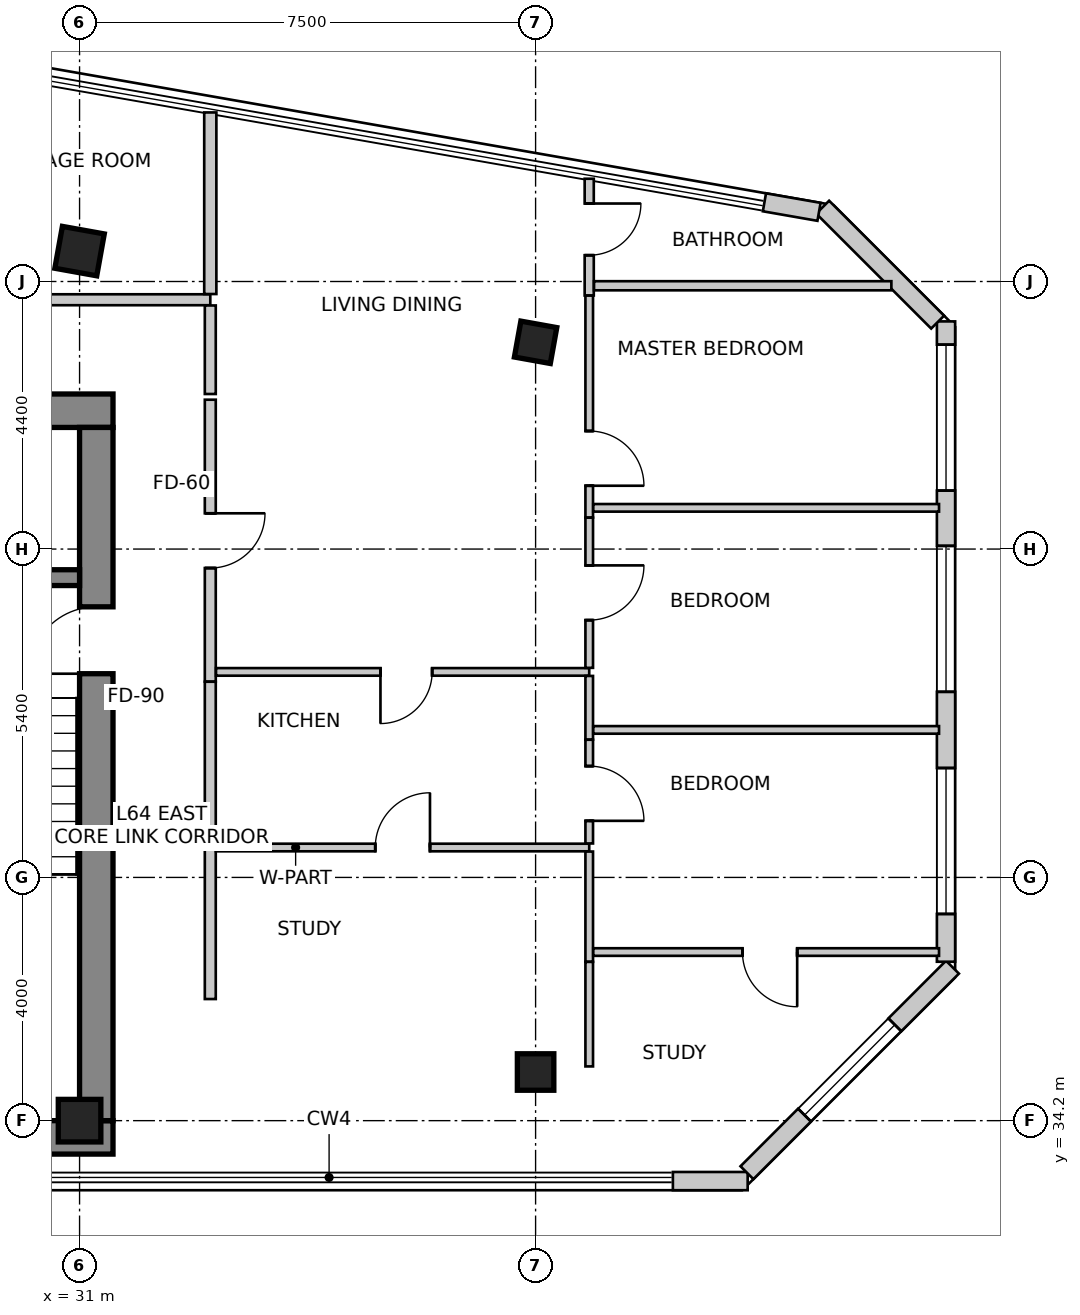
"""IFC4 building model, lengths in metres.
Left out: names, types, materials, properties, quantities, classifications, styles, units other than length and angle.
Written with IfcOpenShell. Run it as: python <this file> out.ifc"""

import sys

from ifc_helpers import new_model, si_unit, direction, frame, frame_2d, origin, origin_2d, place, context, subcontext, project, spatial, rectangle, extrude, source, transform, mapped, element, fill, save


model = new_model("IFC4")
c1 = context("Model", 3, precision=1e-05, world=origin(), true_north=direction((0.0, 1.0)))
c2 = subcontext(c1, "Body", "Model", "MODEL_VIEW")
j1 = project(units=[si_unit("LENGTHUNIT", "METRE"), si_unit("PLANEANGLEUNIT", "RADIAN")], contexts=[c1])
p1 = place(None, origin())
s1 = spatial("IfcSite", under=j1, at=p1, CompositionType="ELEMENT")
p2 = place(p1, origin())
s2 = spatial("IfcBuilding", under=s1, at=p2, CompositionType="ELEMENT")
p3 = place(p2, frame((0.0, 0.0, 252.9)))
s3 = spatial("IfcBuildingStorey", under=s2, at=p3, CompositionType="ELEMENT", Elevation=252.9)
p4 = place(p3, frame((16.05, 45.875, 0.0), z_axis=(0.0, 0.0, 1.0), x_axis=(1.0, 0.0, 0.0)))
e1 = element("IfcWall", 1, at=p4, inside=s3, PredefinedType="SHEAR", context=c2, shape_type="SweptSolid", body=[
    extrude(rectangle(XDim=15.5, YDim=0.55, at=frame_2d((7.75, 0.0))), origin(), (0.0, 0.0, 1.0), 3.6),
])
p5 = place(p3, frame((16.05, 33.925, 0.0), z_axis=(0.0, 0.0, 1.0), x_axis=(1.0, 0.0, 0.0)))
e2 = element("IfcWall", 2, at=p5, inside=s3, PredefinedType="SHEAR", context=c2, shape_type="SweptSolid", body=[
    extrude(rectangle(XDim=15.5, YDim=0.55, at=frame_2d((7.75, 0.0))), origin(), (0.0, 0.0, 1.0), 3.6),
])
m1 = source(origin(), c2, "Body", "SweptSolid", [
    extrude(rectangle(XDim=1.1, YDim=2.15, at=frame_2d((0.55, 1.075))), frame((0.0, 0.285, 0.0), z_axis=(0.0, -1.0, 0.0), x_axis=(1.0, 0.0, 0.0)), (0.0, 0.0, 1.0), 0.57),
])
p6 = place(p5, frame((9.98, 0.0, 0.0)))
e3 = element("IfcOpeningElement", 3, at=p6, cuts=e2, PredefinedType="OPENING", context=c2, shape_type="MappedRepresentation", body=[
    mapped(m1, transform((0.0, 0.0, 0.0), scale=1.0)),
])
p7 = place(p3, frame((31.275, 34.2, 0.0), z_axis=(0.0, 0.0, 1.0), x_axis=(0.0, 1.0, 0.0)))
e4 = element("IfcWall", 4, at=p7, inside=s3, PredefinedType="SHEAR", context=c2, shape_type="SweptSolid", body=[
    extrude(rectangle(XDim=11.4, YDim=0.55, at=frame_2d((5.7, 0.0))), origin(), (0.0, 0.0, 1.0), 3.6),
])
p8 = place(p7, frame((7.35, 0.0, 0.0)))
e5 = element("IfcOpeningElement", 5, at=p8, cuts=e4, PredefinedType="OPENING", context=c2, shape_type="MappedRepresentation", body=[
    mapped(m1, transform((0.0, 0.0, 0.0), scale=1.0)),
])
p9 = place(p3, frame((27.5, 43.13, 0.0), z_axis=(0.0, 0.0, 1.0), x_axis=(1.0, 0.0, 0.0)))
e6 = element("IfcWall", 6, at=p9, inside=s3, PredefinedType="SHEAR", context=c2, shape_type="SweptSolid", body=[
    extrude(rectangle(XDim=3.5, YDim=0.26, at=frame_2d((1.75, 0.0))), origin(), (0.0, 0.0, 1.0), 3.6),
])
m2 = source(origin(), c2, "Body", "SweptSolid", [
    extrude(rectangle(XDim=0.7, YDim=0.7, at=origin_2d()), origin(), (0.0, 0.0, 1.0), 3.6),
])
p10 = place(p3, frame((31.0, 48.5, 0.0), z_axis=(0.0, 0.0, 1.0), x_axis=(0.984195607969, -0.17708474032, 0.0)))
e7 = element("IfcColumn", 7, at=p10, inside=s3, PredefinedType="COLUMN", context=c2, shape_type="MappedRepresentation", body=[
    mapped(m2, transform((0.0, 0.0, 0.0), scale=1.0)),
])
m3 = source(origin(), c2, "Body", "SweptSolid", [
    extrude(rectangle(XDim=0.6, YDim=0.6, at=origin_2d()), origin(), (0.0, 0.0, 1.0), 3.6),
])
p11 = place(p3, frame((38.5, 47.0, 0.0), z_axis=(0.0, 0.0, 1.0), x_axis=(0.984195607969, -0.17708474032, 0.0)))
e8 = element("IfcColumn", 8, at=p11, inside=s3, PredefinedType="COLUMN", context=c2, shape_type="MappedRepresentation", body=[
    mapped(m3, transform((0.0, 0.0, 0.0), scale=1.0)),
])
p12 = place(p3, frame((31.0, 34.2, 0.0), z_axis=(0.0, 0.0, 1.0), x_axis=(1.0, 0.0, 0.0)))
e9 = element("IfcColumn", 9, at=p12, inside=s3, PredefinedType="COLUMN", context=c2, shape_type="MappedRepresentation", body=[
    mapped(m2, transform((0.0, 0.0, 0.0), scale=1.0)),
])
p13 = place(p3, frame((38.5, 35.0, 0.0), z_axis=(0.0, 0.0, 1.0), x_axis=(1.0, 0.0, 0.0)))
e10 = element("IfcColumn", 10, at=p13, inside=s3, PredefinedType="COLUMN", context=c2, shape_type="MappedRepresentation", body=[
    mapped(m3, transform((0.0, 0.0, 0.0), scale=1.0)),
])
p14 = place(p3, frame((40.758, 33.206, 0.0), z_axis=(0.0, 0.0, 1.0), x_axis=(1.0, 0.0, 0.0)))
e11 = element("IfcWall", 11, at=p14, inside=s3, PredefinedType="SOLIDWALL", context=c2, shape_type="SweptSolid", body=[
    extrude(rectangle(XDim=1.23, YDim=0.3, at=frame_2d((0.615, 0.0))), origin(), (0.0, 0.0, 1.0), 3.35),
])
p15 = place(p3, frame((41.976, 33.344, 0.0), z_axis=(0.0, 0.0, 1.0), x_axis=(0.707132316343, 0.707081245108, 0.0)))
e12 = element("IfcWall", 12, at=p15, inside=s3, PredefinedType="SOLIDWALL", context=c2, shape_type="SweptSolid", body=[
    extrude(rectangle(XDim=4.78, YDim=0.3, at=frame_2d((2.39, 0.0))), origin(), (0.0, 0.0, 1.0), 3.35),
])
m4 = source(origin(), c2, "Body", "SweptSolid", [
    extrude(rectangle(XDim=2.1, YDim=2.0, at=frame_2d((1.05, 1.0))), frame((0.0, 0.16, 0.0), z_axis=(0.0, -1.0, 0.0), x_axis=(1.0, 0.0, 0.0)), (0.0, 0.0, 1.0), 0.32),
])
p16 = place(p15, frame((1.34, 0.0, 0.85)))
e13 = element("IfcOpeningElement", 13, at=p16, cuts=e12, PredefinedType="OPENING", context=c2, shape_type="MappedRepresentation", body=[
    mapped(m4, transform((0.0, 0.0, 0.0), scale=1.0)),
])
p17 = place(p3, frame((45.25, 36.813, 0.0), z_axis=(0.0, 0.0, 1.0), x_axis=(0.0, 1.0, 0.0)))
e14 = element("IfcWall", 14, at=p17, inside=s3, PredefinedType="SOLIDWALL", context=c2, shape_type="SweptSolid", body=[
    extrude(rectangle(XDim=10.531, YDim=0.3, at=frame_2d((5.265, 0.0))), origin(), (0.0, 0.0, 1.0), 3.35),
])
m5 = source(origin(), c2, "Body", "SweptSolid", [
    extrude(rectangle(XDim=2.4, YDim=2.2, at=frame_2d((1.2, 1.1))), frame((0.0, 0.16, 0.0), z_axis=(0.0, -1.0, 0.0), x_axis=(1.0, 0.0, 0.0)), (0.0, 0.0, 1.0), 0.32),
])
p18 = place(p17, frame((0.786, 0.0, 0.85)))
e15 = element("IfcOpeningElement", 15, at=p18, cuts=e14, PredefinedType="OPENING", context=c2, shape_type="MappedRepresentation", body=[
    mapped(m5, transform((0.0, 0.0, 0.0), scale=1.0)),
])
p19 = place(p17, frame((4.439, 0.0, 0.85)))
e16 = element("IfcOpeningElement", 16, at=p19, cuts=e14, PredefinedType="OPENING", context=c2, shape_type="MappedRepresentation", body=[
    mapped(m5, transform((0.0, 0.0, 0.0), scale=1.0)),
])
p20 = place(p17, frame((7.748, 0.0, 0.85)))
e17 = element("IfcOpeningElement", 17, at=p20, cuts=e14, PredefinedType="OPENING", context=c2, shape_type="MappedRepresentation", body=[
    mapped(m5, transform((0.0, 0.0, 0.0), scale=1.0)),
])
p21 = place(p3, frame((45.112, 47.332, 0.0), z_axis=(0.0, 0.0, 1.0), x_axis=(-0.707106781187, 0.707106781187, 0.0)))
e18 = element("IfcWall", 18, at=p21, inside=s3, PredefinedType="SOLIDWALL", context=c2, shape_type="SweptSolid", body=[
    extrude(rectangle(XDim=2.674, YDim=0.3, at=frame_2d((1.337, 0.0))), origin(), (0.0, 0.0, 1.0), 3.35),
])
p22 = place(p3, frame((43.161, 49.146, 0.0), z_axis=(0.0, 0.0, 1.0), x_axis=(-0.985052066521, 0.172256861238, 0.0)))
e19 = element("IfcWall", 19, at=p22, inside=s3, PredefinedType="SOLIDWALL", context=c2, shape_type="SweptSolid", body=[
    extrude(rectangle(XDim=0.911, YDim=0.3, at=frame_2d((0.456, 0.0))), origin(), (0.0, 0.0, 1.0), 3.35),
])
p23 = place(p3, frame((28.362, 47.7, 0.0), z_axis=(0.0, 0.0, 1.0), x_axis=(1.0, 0.0, 0.0)))
e20 = element("IfcWall", 20, at=p23, inside=s3, PredefinedType="PARTITIONING", context=c2, shape_type="SweptSolid", body=[
    extrude(rectangle(XDim=4.788, YDim=0.18, at=frame_2d((2.394, 0.0))), origin(), (0.0, 0.0, 1.0), 2.879),
])
m6 = source(origin(), c2, "Body", "SweptSolid", [
    extrude(rectangle(XDim=0.85, YDim=2.15, at=frame_2d((0.425, 1.075))), frame((0.0, 0.1, 0.0), z_axis=(0.0, -1.0, 0.0), x_axis=(1.0, 0.0, 0.0)), (0.0, 0.0, 1.0), 0.2),
])
p24 = place(p23, frame((0.401, 0.0, 0.0)))
e21 = element("IfcOpeningElement", 21, at=p24, cuts=e20, PredefinedType="OPENING", context=c2, shape_type="MappedRepresentation", body=[
    mapped(m6, transform((0.0, 0.0, 0.0), scale=1.0)),
])
p25 = place(p3, frame((33.15, 47.606, 0.0), z_axis=(0.0, 0.0, 1.0), x_axis=(0.0, -1.0, 0.0)))
e22 = element("IfcWall", 22, at=p25, inside=s3, PredefinedType="PARTITIONING", context=c2, shape_type="SweptSolid", body=[
    extrude(rectangle(XDim=1.456, YDim=0.18, at=frame_2d((0.728, 0.0))), origin(), (0.0, 0.0, 1.0), 3.35),
])
p26 = place(p3, frame((33.15, 38.852, 0.0), z_axis=(0.0, 0.0, 1.0), x_axis=(0.0, -1.0, 0.0)))
e23 = element("IfcWall", 23, at=p26, inside=s3, PredefinedType="PARTITIONING", context=c2, shape_type="SweptSolid", body=[
    extrude(rectangle(XDim=2.652, YDim=0.18, at=frame_2d((1.326, 0.0))), origin(), (0.0, 0.0, 1.0), 3.35),
])
p27 = place(p3, frame((33.15, 46.056, 0.0), z_axis=(0.0, 0.0, 1.0), x_axis=(0.0, -1.0, 0.0)))
e24 = element("IfcWall", 24, at=p27, inside=s3, PredefinedType="PARTITIONING", context=c2, shape_type="SweptSolid", body=[
    extrude(rectangle(XDim=4.636, YDim=0.18, at=frame_2d((2.318, 0.0))), origin(), (0.0, 0.0, 1.0), 2.879),
])
m7 = source(origin(), c2, "Body", "SweptSolid", [
    extrude(rectangle(XDim=0.9, YDim=2.15, at=frame_2d((0.45, 1.075))), frame((0.0, 0.1, 0.0), z_axis=(0.0, -1.0, 0.0), x_axis=(1.0, 0.0, 0.0)), (0.0, 0.0, 1.0), 0.2),
])
p28 = place(p27, frame((1.868, 0.0, 0.0)))
e25 = element("IfcOpeningElement", 25, at=p28, cuts=e24, PredefinedType="OPENING", context=c2, shape_type="MappedRepresentation", body=[
    mapped(m7, transform((0.0, 0.0, 0.0), scale=1.0)),
])
p29 = place(p3, frame((33.15, 41.418, 0.0), z_axis=(0.0, 0.0, 1.0), x_axis=(0.0, -1.0, 0.0)))
e26 = element("IfcWall", 26, at=p29, inside=s3, PredefinedType="PARTITIONING", context=c2, shape_type="SweptSolid", body=[
    extrude(rectangle(XDim=2.564, YDim=0.18, at=frame_2d((1.282, 0.0))), origin(), (0.0, 0.0, 1.0), 3.35),
])
p30 = place(p3, frame((33.15, 50.78, 0.0), z_axis=(0.0, 0.0, 1.0), x_axis=(0.0, -1.0, 0.0)))
e27 = element("IfcWall", 27, at=p30, inside=s3, PredefinedType="PARTITIONING", context=c2, shape_type="SweptSolid", body=[
    extrude(rectangle(XDim=2.986, YDim=0.2, at=frame_2d((1.493, 0.0))), origin(), (0.0, 0.0, 1.0), 2.642),
])
p31 = place(p3, frame((33.244, 38.692, 0.0), z_axis=(0.0, 0.0, 1.0), x_axis=(1.0, 0.0, 0.0)))
e28 = element("IfcWall", 28, at=p31, inside=s3, PredefinedType="PARTITIONING", context=c2, shape_type="SweptSolid", body=[
    extrude(rectangle(XDim=6.138, YDim=0.125, at=frame_2d((3.069, 0.0))), origin(), (0.0, 0.0, 1.0), 2.979),
])
m8 = source(origin(), c2, "Body", "SweptSolid", [
    extrude(rectangle(XDim=0.9, YDim=2.15, at=frame_2d((0.45, 1.075))), frame((0.0, 0.073, 0.0), z_axis=(0.0, -1.0, 0.0), x_axis=(1.0, 0.0, 0.0)), (0.0, 0.0, 1.0), 0.145),
])
p32 = place(p31, frame((2.619, 0.0, 0.0)))
e29 = element("IfcOpeningElement", 29, at=p32, cuts=e28, PredefinedType="OPENING", context=c2, shape_type="MappedRepresentation", body=[
    mapped(m8, transform((0.0, 0.0, 0.0), scale=1.0)),
])
p33 = place(p3, frame((39.382, 38.625, 0.0), z_axis=(0.0, 0.0, 1.0), x_axis=(0.0, -1.0, 0.0)))
e30 = element("IfcWall", 30, at=p33, inside=s3, PredefinedType="PARTITIONING", context=c2, shape_type="SweptSolid", body=[
    extrude(rectangle(XDim=1.812, YDim=0.125, at=frame_2d((0.906, 0.0))), origin(), (0.0, 0.0, 1.0), 3.35),
])
p34 = place(p3, frame((39.382, 36.811, 0.0), z_axis=(0.0, 0.0, 1.0), x_axis=(0.0, -1.0, 0.0)))
e31 = element("IfcWall", 31, at=p34, inside=s3, PredefinedType="PARTITIONING", context=c2, shape_type="SweptSolid", body=[
    extrude(rectangle(XDim=1.719, YDim=0.125, at=frame_2d((0.859, 0.0))), origin(), (0.0, 0.0, 1.0), 3.35),
])
p35 = place(p3, frame((39.382, 41.58, 0.0), z_axis=(0.0, 0.0, 1.0), x_axis=(-1.0, 0.0, 0.0)))
e32 = element("IfcWall", 32, at=p35, inside=s3, PredefinedType="PARTITIONING", context=c2, shape_type="SweptSolid", body=[
    extrude(rectangle(XDim=6.138, YDim=0.125, at=frame_2d((3.069, 0.0))), origin(), (0.0, 0.0, 1.0), 2.979),
])
m9 = source(origin(), c2, "Body", "SweptSolid", [
    extrude(rectangle(XDim=0.85, YDim=2.15, at=frame_2d((0.425, 1.075))), frame((0.0, 0.073, 0.0), z_axis=(0.0, -1.0, 0.0), x_axis=(1.0, 0.0, 0.0)), (0.0, 0.0, 1.0), 0.145),
])
p36 = place(p35, frame((2.583, 0.0, 0.0)))
e33 = element("IfcOpeningElement", 33, at=p36, cuts=e32, PredefinedType="OPENING", context=c2, shape_type="MappedRepresentation", body=[
    mapped(m9, transform((0.0, 0.0, 0.0), scale=1.0)),
])
p37 = place(p3, frame((39.382, 49.69, 0.0), z_axis=(0.0, 0.0, 1.0), x_axis=(0.0, -1.0, 0.0)))
e34 = element("IfcWall", 34, at=p37, inside=s3, PredefinedType="PARTITIONING", context=c2, shape_type="SweptSolid", body=[
    extrude(rectangle(XDim=1.92, YDim=0.15, at=frame_2d((0.96, 0.0))), origin(), (0.0, 0.0, 1.0), 3.35),
])
m10 = source(origin(), c2, "Body", "SweptSolid", [
    extrude(rectangle(XDim=0.85, YDim=2.15, at=frame_2d((0.425, 1.075))), frame((0.0, 0.085, 0.0), z_axis=(0.0, -1.0, 0.0), x_axis=(1.0, 0.0, 0.0)), (0.0, 0.0, 1.0), 0.17),
])
p38 = place(p37, frame((0.407, 0.0, 0.0)))
e35 = element("IfcOpeningElement", 35, at=p38, cuts=e34, PredefinedType="OPENING", context=c2, shape_type="MappedRepresentation", body=[
    mapped(m10, transform((0.0, 0.0, 0.0), scale=1.0)),
])
p39 = place(p3, frame((39.382, 47.768, 0.0), z_axis=(0.0, 0.0, 1.0), x_axis=(0.0, -1.0, 0.0)))
e36 = element("IfcWall", 36, at=p39, inside=s3, PredefinedType="PARTITIONING", context=c2, shape_type="SweptSolid", body=[
    extrude(rectangle(XDim=3.65, YDim=0.125, at=frame_2d((1.825, 0.0))), origin(), (0.0, 0.0, 1.0), 3.35),
])
p40 = place(p39, frame((2.227, 0.0, 0.0)))
e37 = element("IfcOpeningElement", 37, at=p40, cuts=e36, PredefinedType="OPENING", context=c2, shape_type="MappedRepresentation", body=[
    mapped(m8, transform((0.0, 0.0, 0.0), scale=1.0)),
])
p41 = place(p3, frame((39.382, 44.116, 0.0), z_axis=(0.0, 0.0, 1.0), x_axis=(0.0, -1.0, 0.0)))
e38 = element("IfcWall", 38, at=p41, inside=s3, PredefinedType="PARTITIONING", context=c2, shape_type="SweptSolid", body=[
    extrude(rectangle(XDim=2.469, YDim=0.125, at=frame_2d((1.235, 0.0))), origin(), (0.0, 0.0, 1.0), 3.35),
])
p42 = place(p41, frame((0.785, 0.0, 0.0)))
e39 = element("IfcOpeningElement", 39, at=p42, cuts=e38, PredefinedType="OPENING", context=c2, shape_type="MappedRepresentation", body=[
    mapped(m8, transform((0.0, 0.0, 0.0), scale=1.0)),
])
p43 = place(p3, frame((39.382, 41.513, 0.0), z_axis=(0.0, 0.0, 1.0), x_axis=(0.0, -1.0, 0.0)))
e40 = element("IfcWall", 40, at=p43, inside=s3, PredefinedType="PARTITIONING", context=c2, shape_type="SweptSolid", body=[
    extrude(rectangle(XDim=1.047, YDim=0.125, at=frame_2d((0.524, 0.0))), origin(), (0.0, 0.0, 1.0), 3.35),
])
p44 = place(p3, frame((39.382, 40.464, 0.0), z_axis=(0.0, 0.0, 1.0), x_axis=(0.0, -1.0, 0.0)))
e41 = element("IfcWall", 41, at=p44, inside=s3, PredefinedType="PARTITIONING", context=c2, shape_type="SweptSolid", body=[
    extrude(rectangle(XDim=1.706, YDim=0.125, at=frame_2d((0.853, 0.0))), origin(), (0.0, 0.0, 1.0), 3.35),
])
p45 = place(p44, frame((0.433, 0.0, 0.0)))
e42 = element("IfcOpeningElement", 42, at=p45, cuts=e41, PredefinedType="OPENING", context=c2, shape_type="MappedRepresentation", body=[
    mapped(m8, transform((0.0, 0.0, 0.0), scale=1.0)),
])
p46 = place(p3, frame((44.351, 47.93, 0.0), z_axis=(0.0, 0.0, 1.0), x_axis=(-1.0, 0.0, 0.0)))
e43 = element("IfcWall", 43, at=p46, inside=s3, PredefinedType="PARTITIONING", context=c2, shape_type="SweptSolid", body=[
    extrude(rectangle(XDim=4.89, YDim=0.15, at=frame_2d((2.445, 0.0))), origin(), (0.0, 0.0, 1.0), 3.35),
])
for number, where, z_axis, x_axis in (
    (44, (45.135, 44.278, 0.0), (0.0, 0.0, 1.0), (-1.0, 0.0, 0.0)),
    (45, (45.135, 40.626, 0.0), (0.0, 0.0, 1.0), (-1.0, 0.0, 0.0)),
):
    element("IfcWall", number, at=place(p3, frame(where, z_axis=z_axis, x_axis=x_axis)), inside=s3, PredefinedType="PARTITIONING", context=c2, shape_type="SweptSolid", body=[
        extrude(rectangle(XDim=5.687, YDim=0.125, at=frame_2d((2.843, 0.0))), origin(), (0.0, 0.0, 1.0), 3.35),
    ])
p47 = place(p3, frame((45.135, 36.973, 0.0), z_axis=(0.0, 0.0, 1.0), x_axis=(-1.0, 0.0, 0.0)))
e46 = element("IfcWall", 46, at=p47, inside=s3, PredefinedType="PARTITIONING", context=c2, shape_type="SweptSolid", body=[
    extrude(rectangle(XDim=5.687, YDim=0.125, at=frame_2d((2.843, 0.0))), origin(), (0.0, 0.0, 1.0), 3.35),
])
p48 = place(p47, frame((2.333, 0.0, 0.0)))
e47 = element("IfcOpeningElement", 47, at=p48, cuts=e46, PredefinedType="OPENING", context=c2, shape_type="MappedRepresentation", body=[
    mapped(m8, transform((0.0, 0.0, 0.0), scale=1.0)),
])
m11 = source(origin(), c2, "Body", "SweptSolid", [
    extrude(rectangle(XDim=2.1, YDim=2.0, at=frame_2d((1.05, 1.0))), frame((0.0, -0.015, 0.0), z_axis=(0.0, -1.0, 0.0), x_axis=(1.0, 0.0, 0.0)), (0.0, 0.0, 1.0), 0.06),
])
p49 = place(p16, origin())
e48 = element("IfcWindow", 48, at=p49, inside=s3, PartitioningType="SINGLE_PANEL", PredefinedType="WINDOW", context=c2, shape_type="MappedRepresentation", body=[
    mapped(m11, transform((0.0, 0.0, 0.0), scale=1.0)),
])
fill(e13, e48)
m12 = source(origin(), c2, "Body", "SweptSolid", [
    extrude(rectangle(XDim=2.4, YDim=2.2, at=frame_2d((1.2, 1.1))), frame((0.0, -0.015, 0.0), z_axis=(0.0, -1.0, 0.0), x_axis=(1.0, 0.0, 0.0)), (0.0, 0.0, 1.0), 0.06),
])
p50 = place(p18, origin())
e49 = element("IfcWindow", 49, at=p50, inside=s3, PartitioningType="SINGLE_PANEL", PredefinedType="WINDOW", context=c2, shape_type="MappedRepresentation", body=[
    mapped(m12, transform((0.0, 0.0, 0.0), scale=1.0)),
])
fill(e15, e49)
p51 = place(p19, origin())
e50 = element("IfcWindow", 50, at=p51, inside=s3, PartitioningType="SINGLE_PANEL", PredefinedType="WINDOW", context=c2, shape_type="MappedRepresentation", body=[
    mapped(m12, transform((0.0, 0.0, 0.0), scale=1.0)),
])
fill(e16, e50)
p52 = place(p20, origin())
e51 = element("IfcWindow", 51, at=p52, inside=s3, PartitioningType="SINGLE_PANEL", PredefinedType="WINDOW", context=c2, shape_type="MappedRepresentation", body=[
    mapped(m12, transform((0.0, 0.0, 0.0), scale=1.0)),
])
fill(e17, e51)
m13 = source(origin(), c2, "Body", "SweptSolid", [
    extrude(rectangle(XDim=1.1, YDim=2.15, at=frame_2d((0.55, 1.075))), frame((0.0, 0.025, 0.0), z_axis=(0.0, -1.0, 0.0), x_axis=(1.0, 0.0, 0.0)), (0.0, 0.0, 1.0), 0.05),
])
p53 = place(p8, origin())
e52 = element("IfcDoor", 52, at=p53, inside=s3, OperationType="SINGLE_SWING_LEFT", PredefinedType="DOOR", context=c2, shape_type="MappedRepresentation", body=[
    mapped(m13, transform((0.0, 0.0, 0.0), scale=1.0)),
])
fill(e5, e52)
m14 = source(origin(), c2, "Body", "SweptSolid", [
    extrude(rectangle(XDim=0.9, YDim=2.15, at=frame_2d((0.45, 1.075))), frame((0.0, 0.025, 0.0), z_axis=(0.0, -1.0, 0.0), x_axis=(1.0, 0.0, 0.0)), (0.0, 0.0, 1.0), 0.05),
])
p54 = place(p32, origin())
e53 = element("IfcDoor", 53, at=p54, inside=s3, OperationType="SINGLE_SWING_RIGHT", PredefinedType="DOOR", context=c2, shape_type="MappedRepresentation", body=[
    mapped(m14, transform((0.0, 0.0, 0.0), scale=1.0)),
])
fill(e29, e53)
m15 = source(origin(), c2, "Body", "SweptSolid", [
    extrude(rectangle(XDim=0.9, YDim=2.15, at=frame_2d((0.45, 1.075))), frame((0.0, 0.025, 0.0), z_axis=(0.0, -1.0, 0.0), x_axis=(1.0, 0.0, 0.0)), (0.0, 0.0, 1.0), 0.05),
])
p55 = place(p28, origin())
e54 = element("IfcDoor", 54, at=p55, inside=s3, OperationType="SINGLE_SWING_LEFT", PredefinedType="DOOR", context=c2, shape_type="MappedRepresentation", body=[
    mapped(m15, transform((0.0, 0.0, 0.0), scale=1.0)),
])
fill(e25, e54)
m16 = source(origin(), c2, "Body", "SweptSolid", [
    extrude(rectangle(XDim=0.85, YDim=2.15, at=frame_2d((0.425, 1.075))), frame((0.0, 0.025, 0.0), z_axis=(0.0, -1.0, 0.0), x_axis=(1.0, 0.0, 0.0)), (0.0, 0.0, 1.0), 0.05),
])
p56 = place(p36, origin())
e55 = element("IfcDoor", 55, at=p56, inside=s3, OperationType="SINGLE_SWING_RIGHT", PredefinedType="DOOR", context=c2, shape_type="MappedRepresentation", body=[
    mapped(m16, transform((0.0, 0.0, 0.0), scale=1.0)),
])
fill(e33, e55)
p57 = place(p38, origin())
e56 = element("IfcDoor", 56, at=p57, inside=s3, OperationType="SINGLE_SWING_LEFT", PredefinedType="DOOR", context=c2, shape_type="MappedRepresentation", body=[
    mapped(m16, transform((0.0, 0.0, 0.0), scale=1.0)),
])
fill(e35, e56)
p58 = place(p40, origin())
e57 = element("IfcDoor", 57, at=p58, inside=s3, OperationType="SINGLE_SWING_RIGHT", PredefinedType="DOOR", context=c2, shape_type="MappedRepresentation", body=[
    mapped(m14, transform((0.0, 0.0, 0.0), scale=1.0)),
])
fill(e37, e57)
p59 = place(p42, origin())
e58 = element("IfcDoor", 58, at=p59, inside=s3, OperationType="SINGLE_SWING_LEFT", PredefinedType="DOOR", context=c2, shape_type="MappedRepresentation", body=[
    mapped(m14, transform((0.0, 0.0, 0.0), scale=1.0)),
])
fill(e39, e58)
p60 = place(p45, origin())
e59 = element("IfcDoor", 59, at=p60, inside=s3, OperationType="SINGLE_SWING_RIGHT", PredefinedType="DOOR", context=c2, shape_type="MappedRepresentation", body=[
    mapped(m14, transform((0.0, 0.0, 0.0), scale=1.0)),
])
fill(e42, e59)
p61 = place(p48, origin())
e60 = element("IfcDoor", 60, at=p61, inside=s3, OperationType="SINGLE_SWING_LEFT", PredefinedType="DOOR", context=c2, shape_type="MappedRepresentation", body=[
    mapped(m14, transform((0.0, 0.0, 0.0), scale=1.0)),
])
fill(e47, e60)
save(model, sys.argv[1])
